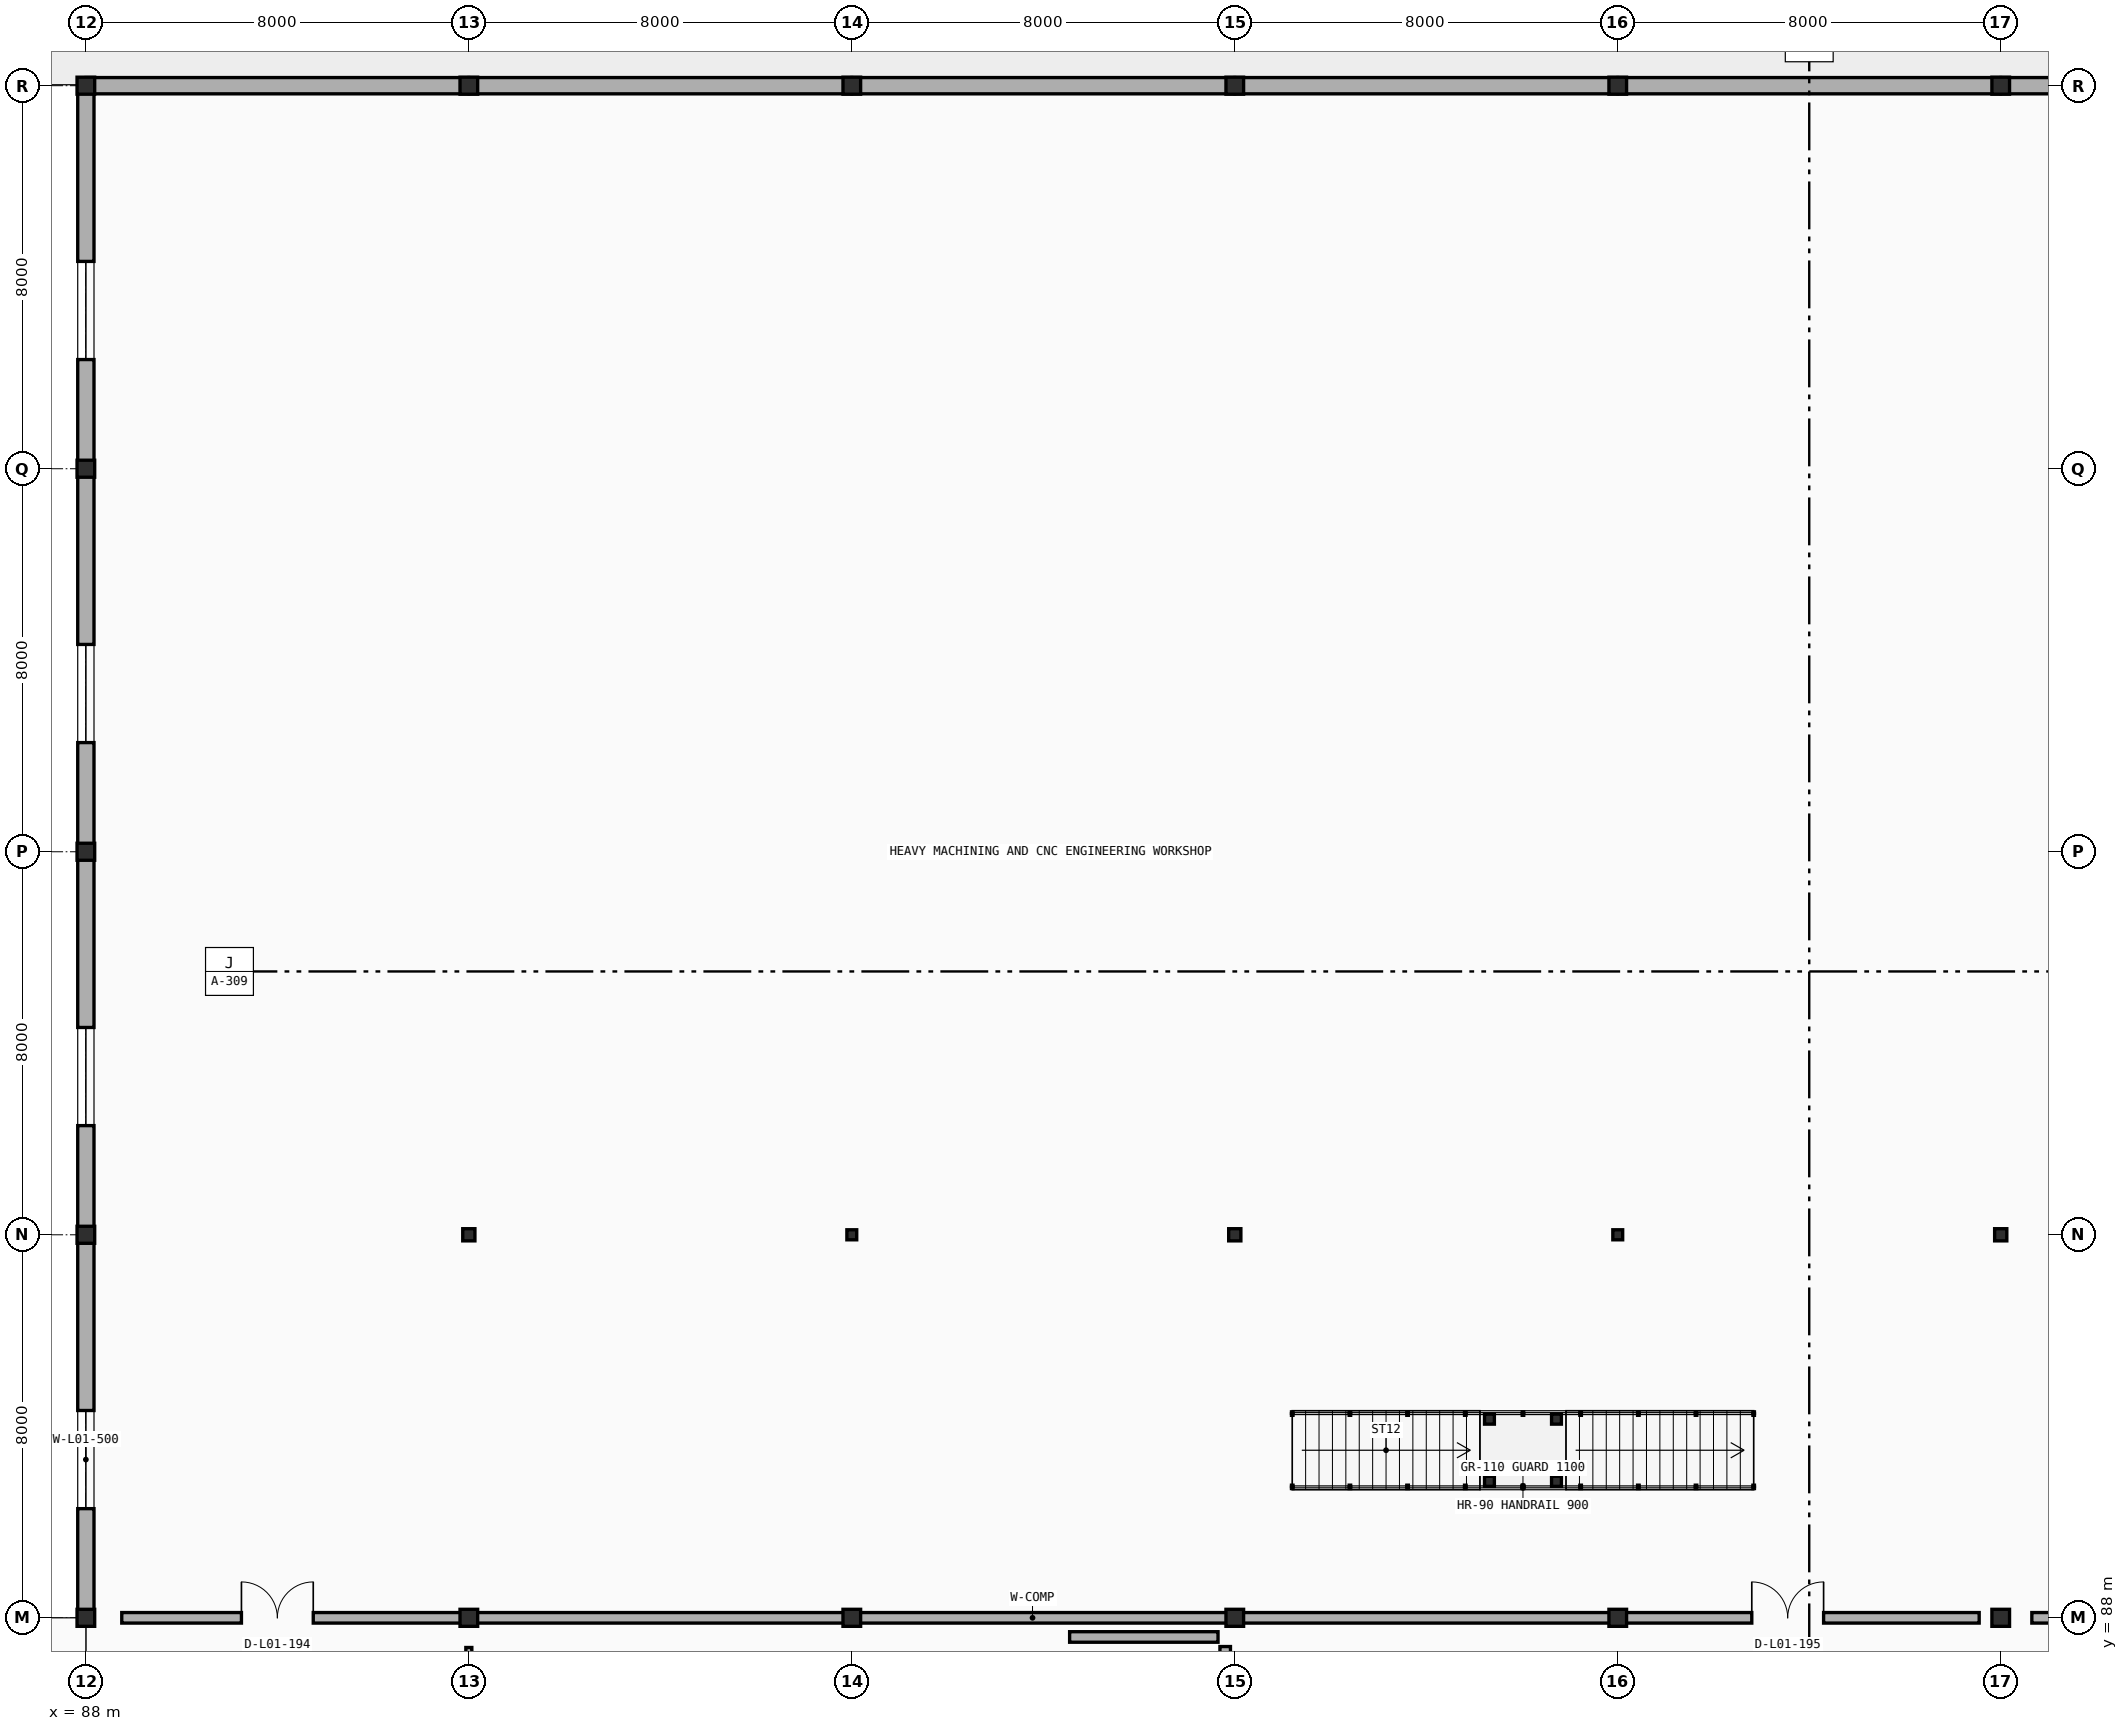
"""IFC4 building model, lengths in metres.
Left out: names, types, materials, properties, quantities, classifications, styles, units other than length and angle.
Written with IfcOpenShell. Run it as: python <this file> out.ifc"""

import sys

from ifc_helpers import new_model, si_unit, direction, frame, frame_2d, origin, origin_2d, place, context, subcontext, project, spatial, rectangle, i_section, extrude, element, fill, save


model = new_model("IFC4")
c1 = context("Model", 3, precision=1e-05, world=origin(), true_north=direction((0.0, 1.0)))
c2 = subcontext(c1, "Body", "Model", "MODEL_VIEW")
j1 = project(units=[si_unit("LENGTHUNIT", "METRE"), si_unit("PLANEANGLEUNIT", "RADIAN")], contexts=[c1])
p1 = place(None, origin())
s1 = spatial("IfcSite", under=j1, at=p1, CompositionType="ELEMENT")
p2 = place(p1, origin())
s2 = spatial("IfcBuilding", under=s1, at=p2, CompositionType="ELEMENT")
p3 = place(p2, origin())
s3 = spatial("IfcBuildingStorey", under=s2, at=p3, CompositionType="ELEMENT", Elevation=0.0)
for number, where, z_axis, x_axis in (
    (1, (88.0, 88.0, 0.0), (0.0, 0.0, 1.0), (1.0, 0.0, 0.0)),
    (2, (96.0, 88.0, 0.0), (0.0, 0.0, 1.0), (1.0, 0.0, 0.0)),
    (3, (104.0, 88.0, 0.0), (0.0, 0.0, 1.0), (1.0, 0.0, 0.0)),
    (4, (112.0, 88.0, 0.0), (0.0, 0.0, 1.0), (1.0, 0.0, 0.0)),
    (5, (120.0, 88.0, 0.0), (0.0, 0.0, 1.0), (1.0, 0.0, 0.0)),
    (6, (128.0, 88.0, 0.0), (0.0, 0.0, 1.0), (1.0, 0.0, 0.0)),
    (7, (88.0, 96.0, 0.0), (0.0, 0.0, 1.0), (1.0, 0.0, 0.0)),
):
    element("IfcColumn", number, at=place(p3, frame(where, z_axis=z_axis, x_axis=x_axis)), inside=s3, PredefinedType="COLUMN", context=c2, shape_type="SweptSolid", body=[
        extrude(i_section(OverallWidth=0.369, OverallDepth=0.356, WebThickness=0.01, FlangeThickness=0.018, FilletRadius=0.015, at=origin_2d()), origin(), (0.0, 0.0, 1.0), 4.8),
    ])
p4 = place(p3, frame((96.0, 96.0, 0.0), z_axis=(0.0, 0.0, 1.0), x_axis=(1.0, 0.0, 0.0)))
e8 = element("IfcColumn", 8, at=p4, inside=s3, PredefinedType="COLUMN", context=c2, shape_type="SweptSolid", body=[
    extrude(i_section(OverallWidth=0.255, OverallDepth=0.254, WebThickness=0.009, FlangeThickness=0.014, FilletRadius=0.013, at=origin_2d()), origin(), (0.0, 0.0, 1.0), 4.8),
])
p5 = place(p3, frame((104.0, 96.0, 0.0), z_axis=(0.0, 0.0, 1.0), x_axis=(1.0, 0.0, 0.0)))
e9 = element("IfcColumn", 9, at=p5, inside=s3, PredefinedType="COLUMN", context=c2, shape_type="SweptSolid", body=[
    extrude(i_section(OverallWidth=0.206, OverallDepth=0.21, WebThickness=0.01, FlangeThickness=0.014, FilletRadius=0.01, at=origin_2d()), origin(), (0.0, 0.0, 1.0), 4.8),
])
p6 = place(p3, frame((112.0, 96.0, 0.0), z_axis=(0.0, 0.0, 1.0), x_axis=(1.0, 0.0, 0.0)))
e10 = element("IfcColumn", 10, at=p6, inside=s3, PredefinedType="COLUMN", context=c2, shape_type="SweptSolid", body=[
    extrude(i_section(OverallWidth=0.255, OverallDepth=0.254, WebThickness=0.009, FlangeThickness=0.014, FilletRadius=0.013, at=origin_2d()), origin(), (0.0, 0.0, 1.0), 4.8),
])
p7 = place(p3, frame((120.0, 96.0, 0.0), z_axis=(0.0, 0.0, 1.0), x_axis=(1.0, 0.0, 0.0)))
e11 = element("IfcColumn", 11, at=p7, inside=s3, PredefinedType="COLUMN", context=c2, shape_type="SweptSolid", body=[
    extrude(i_section(OverallWidth=0.206, OverallDepth=0.21, WebThickness=0.01, FlangeThickness=0.014, FilletRadius=0.01, at=origin_2d()), origin(), (0.0, 0.0, 1.0), 4.8),
])
p8 = place(p3, frame((128.0, 96.0, 0.0), z_axis=(0.0, 0.0, 1.0), x_axis=(1.0, 0.0, 0.0)))
e12 = element("IfcColumn", 12, at=p8, inside=s3, PredefinedType="COLUMN", context=c2, shape_type="SweptSolid", body=[
    extrude(i_section(OverallWidth=0.255, OverallDepth=0.254, WebThickness=0.009, FlangeThickness=0.014, FilletRadius=0.013, at=origin_2d()), origin(), (0.0, 0.0, 1.0), 4.8),
])
for number, where, z_axis, x_axis in (
    (13, (88.0, 104.0, 0.0), (0.0, 0.0, 1.0), (1.0, 0.0, 0.0)),
    (14, (88.0, 112.0, 0.0), (0.0, 0.0, 1.0), (1.0, 0.0, 0.0)),
    (15, (88.0, 120.0, 0.0), (0.0, 0.0, 1.0), (1.0, 0.0, 0.0)),
    (16, (96.0, 120.0, 0.0), (0.0, 0.0, 1.0), (1.0, 0.0, 0.0)),
    (17, (104.0, 120.0, 0.0), (0.0, 0.0, 1.0), (1.0, 0.0, 0.0)),
    (18, (112.0, 120.0, 0.0), (0.0, 0.0, 1.0), (1.0, 0.0, 0.0)),
    (19, (120.0, 120.0, 0.0), (0.0, 0.0, 1.0), (1.0, 0.0, 0.0)),
    (20, (128.0, 120.0, 0.0), (0.0, 0.0, 1.0), (1.0, 0.0, 0.0)),
):
    element("IfcColumn", number, at=place(p3, frame(where, z_axis=z_axis, x_axis=x_axis)), inside=s3, PredefinedType="COLUMN", context=c2, shape_type="SweptSolid", body=[
        extrude(i_section(OverallWidth=0.369, OverallDepth=0.356, WebThickness=0.01, FlangeThickness=0.018, FilletRadius=0.015, at=origin_2d()), origin(), (0.0, 0.0, 1.0), 4.8),
    ])
for number, where, z_axis, x_axis in (
    (21, (117.32, 90.85, 0.0), (0.0, 0.0, 1.0), (1.0, 0.0, 0.0)),
    (22, (117.32, 92.15, 0.0), (0.0, 0.0, 1.0), (1.0, 0.0, 0.0)),
    (23, (118.72, 90.85, 0.0), (0.0, 0.0, 1.0), (1.0, 0.0, 0.0)),
    (24, (118.72, 92.15, 0.0), (0.0, 0.0, 1.0), (1.0, 0.0, 0.0)),
):
    element("IfcColumn", number, at=place(p3, frame(where, z_axis=z_axis, x_axis=x_axis)), inside=s3, PredefinedType="COLUMN", context=c2, shape_type="SweptSolid", body=[
        extrude(i_section(OverallWidth=0.206, OverallDepth=0.21, WebThickness=0.01, FlangeThickness=0.014, FilletRadius=0.01, at=origin_2d()), origin(), (0.0, 0.0, 1.0), 2.2),
    ])
p9 = place(p3, frame((48.0, 120.45, 0.0), z_axis=(0.0, 0.0, 1.0), x_axis=(1.0, 0.0, 0.0)))
e25 = element("IfcWall", 25, at=p9, inside=s3, PredefinedType="PARAPET", context=c2, shape_type="SweptSolid", body=[
    extrude(rectangle(XDim=136.0, YDim=0.3, at=frame_2d((68.0, 0.0))), origin(), (0.0, 0.0, 1.0), 4.65),
])
for number, where, z_axis, x_axis in (
    (26, (88.004, 120.0, 0.0), (0.0, 0.0, 1.0), (1.0, 0.0, 0.0)),
    (27, (96.004, 120.0, 0.0), (0.0, 0.0, 1.0), (1.0, 0.0, 0.0)),
    (28, (104.004, 120.0, 0.0), (0.0, 0.0, 1.0), (1.0, 0.0, 0.0)),
    (29, (112.004, 120.0, 0.0), (0.0, 0.0, 1.0), (1.0, 0.0, 0.0)),
    (30, (120.004, 120.0, 0.0), (0.0, 0.0, 1.0), (1.0, 0.0, 0.0)),
    (31, (128.004, 120.0, 0.0), (0.0, 0.0, 1.0), (1.0, 0.0, 0.0)),
):
    element("IfcWall", number, at=place(p3, frame(where, z_axis=z_axis, x_axis=x_axis)), inside=s3, PredefinedType="STANDARD", context=c2, shape_type="SweptSolid", body=[
        extrude(rectangle(XDim=7.992, YDim=0.34, at=frame_2d((3.996, 0.0))), origin(), (0.0, 0.0, 1.0), 4.12),
    ])
p10 = place(p3, frame((88.0, 88.004, 0.0), z_axis=(0.0, 0.0, 1.0), x_axis=(0.0, 1.0, 0.0)))
e32 = element("IfcWall", 32, at=p10, inside=s3, PredefinedType="STANDARD", context=c2, shape_type="SweptSolid", body=[
    extrude(rectangle(XDim=7.992, YDim=0.34, at=frame_2d((3.996, 0.0))), origin(), (0.0, 0.0, 1.0), 4.037),
])
p11 = place(p10, frame((2.276, 0.0, 1.2)))
e33 = element("IfcOpeningElement", 33, at=p11, cuts=e32, PredefinedType="OPENING", context=c2, shape_type="SweptSolid", body=[
    extrude(rectangle(XDim=2.05, YDim=2.0, at=frame_2d((1.025, 1.0))), frame((0.0, 0.18, 0.0), z_axis=(0.0, -1.0, 0.0), x_axis=(1.0, 0.0, 0.0)), (0.0, 0.0, 1.0), 0.36),
])
p12 = place(p3, frame((88.0, 96.004, 0.0), z_axis=(0.0, 0.0, 1.0), x_axis=(0.0, 1.0, 0.0)))
e34 = element("IfcWall", 34, at=p12, inside=s3, PredefinedType="STANDARD", context=c2, shape_type="SweptSolid", body=[
    extrude(rectangle(XDim=7.992, YDim=0.34, at=frame_2d((3.996, 0.0))), origin(), (0.0, 0.0, 1.0), 4.12),
])
p13 = place(p12, frame((2.276, 0.0, 1.2)))
e35 = element("IfcOpeningElement", 35, at=p13, cuts=e34, PredefinedType="OPENING", context=c2, shape_type="SweptSolid", body=[
    extrude(rectangle(XDim=2.05, YDim=2.0, at=frame_2d((1.025, 1.0))), frame((0.0, 0.18, 0.0), z_axis=(0.0, -1.0, 0.0), x_axis=(1.0, 0.0, 0.0)), (0.0, 0.0, 1.0), 0.36),
])
p14 = place(p3, frame((88.0, 104.004, 0.0), z_axis=(0.0, 0.0, 1.0), x_axis=(0.0, 1.0, 0.0)))
e36 = element("IfcWall", 36, at=p14, inside=s3, PredefinedType="STANDARD", context=c2, shape_type="SweptSolid", body=[
    extrude(rectangle(XDim=7.992, YDim=0.34, at=frame_2d((3.996, 0.0))), origin(), (0.0, 0.0, 1.0), 4.12),
])
p15 = place(p14, frame((2.276, 0.0, 1.2)))
e37 = element("IfcOpeningElement", 37, at=p15, cuts=e36, PredefinedType="OPENING", context=c2, shape_type="SweptSolid", body=[
    extrude(rectangle(XDim=2.05, YDim=2.0, at=frame_2d((1.025, 1.0))), frame((0.0, 0.18, 0.0), z_axis=(0.0, -1.0, 0.0), x_axis=(1.0, 0.0, 0.0)), (0.0, 0.0, 1.0), 0.36),
])
p16 = place(p3, frame((88.0, 112.004, 0.0), z_axis=(0.0, 0.0, 1.0), x_axis=(0.0, 1.0, 0.0)))
e38 = element("IfcWall", 38, at=p16, inside=s3, PredefinedType="STANDARD", context=c2, shape_type="SweptSolid", body=[
    extrude(rectangle(XDim=7.992, YDim=0.34, at=frame_2d((3.996, 0.0))), origin(), (0.0, 0.0, 1.0), 4.12),
])
p17 = place(p16, frame((2.276, 0.0, 1.2)))
e39 = element("IfcOpeningElement", 39, at=p17, cuts=e38, PredefinedType="OPENING", context=c2, shape_type="SweptSolid", body=[
    extrude(rectangle(XDim=2.05, YDim=2.0, at=frame_2d((1.025, 1.0))), frame((0.0, 0.18, 0.0), z_axis=(0.0, -1.0, 0.0), x_axis=(1.0, 0.0, 0.0)), (0.0, 0.0, 1.0), 0.36),
])
p18 = place(p3, frame((108.55, 87.6, 0.0), z_axis=(0.0, 0.0, 1.0), x_axis=(1.0, 0.0, 0.0)))
e40 = element("IfcWall", 40, at=p18, inside=s3, PredefinedType="PARTITIONING", context=c2, shape_type="SweptSolid", body=[
    extrude(rectangle(XDim=3.1, YDim=0.22, at=frame_2d((1.55, 0.0))), origin(), (0.0, 0.0, 1.0), 3.795),
])
p19 = place(p3, frame((111.8, 81.2, 0.0), z_axis=(0.0, 0.0, 1.0), x_axis=(0.0, 1.0, 0.0)))
e41 = element("IfcWall", 41, at=p19, inside=s3, PredefinedType="PARTITIONING", context=c2, shape_type="SweptSolid", body=[
    extrude(rectangle(XDim=6.2, YDim=0.22, at=frame_2d((3.1, 0.0))), origin(), (0.0, 0.0, 1.0), 3.745),
])
p20 = place(p19, frame((3.8, 0.0, 0.0)))
e42 = element("IfcOpeningElement", 42, at=p20, cuts=e41, PredefinedType="OPENING", context=c2, shape_type="SweptSolid", body=[
    extrude(rectangle(XDim=1.5, YDim=2.2, at=frame_2d((0.75, 1.1))), frame((0.0, 0.12, 0.0), z_axis=(0.0, -1.0, 0.0), x_axis=(1.0, 0.0, 0.0)), (0.0, 0.0, 1.0), 0.24),
])
p21 = place(p3, frame((88.75, 88.0, 0.0), z_axis=(0.0, 0.0, 1.0), x_axis=(1.0, 0.0, 0.0)))
e43 = element("IfcWall", 43, at=p21, inside=s3, PredefinedType="PARTITIONING", context=c2, shape_type="SweptSolid", body=[
    extrude(rectangle(XDim=38.8, YDim=0.22, at=frame_2d((19.4, 0.0))), origin(), (0.0, 0.0, 1.0), 3.795),
])
p22 = place(p21, frame((2.5, 0.0, 0.0)))
e44 = element("IfcOpeningElement", 44, at=p22, cuts=e43, PredefinedType="OPENING", context=c2, shape_type="SweptSolid", body=[
    extrude(rectangle(XDim=1.5, YDim=2.2, at=frame_2d((0.75, 1.1))), frame((0.0, 0.12, 0.0), z_axis=(0.0, -1.0, 0.0), x_axis=(1.0, 0.0, 0.0)), (0.0, 0.0, 1.0), 0.24),
])
p23 = place(p21, frame((34.05, 0.0, 0.0)))
e45 = element("IfcOpeningElement", 45, at=p23, cuts=e43, PredefinedType="OPENING", context=c2, shape_type="SweptSolid", body=[
    extrude(rectangle(XDim=1.5, YDim=2.2, at=frame_2d((0.75, 1.1))), frame((0.0, 0.12, 0.0), z_axis=(0.0, -1.0, 0.0), x_axis=(1.0, 0.0, 0.0)), (0.0, 0.0, 1.0), 0.24),
])
p24 = place(p3, frame((128.65, 88.0, 0.0), z_axis=(0.0, 0.0, 1.0), x_axis=(1.0, 0.0, 0.0)))
e46 = element("IfcWall", 46, at=p24, inside=s3, PredefinedType="PARTITIONING", context=c2, shape_type="SweptSolid", body=[
    extrude(rectangle(XDim=38.9, YDim=0.22, at=frame_2d((19.45, 0.0))), origin(), (0.0, 0.0, 1.0), 3.795),
])
p25 = place(p24, frame((2.6, 0.0, 0.0)))
e47 = element("IfcOpeningElement", 47, at=p25, cuts=e46, PredefinedType="OPENING", context=c2, shape_type="SweptSolid", body=[
    extrude(rectangle(XDim=1.5, YDim=2.2, at=frame_2d((0.75, 1.1))), frame((0.0, 0.12, 0.0), z_axis=(0.0, -1.0, 0.0), x_axis=(1.0, 0.0, 0.0)), (0.0, 0.0, 1.0), 0.24),
])
p26 = place(p24, frame((34.15, 0.0, 0.0)))
e48 = element("IfcOpeningElement", 48, at=p26, cuts=e46, PredefinedType="OPENING", context=c2, shape_type="SweptSolid", body=[
    extrude(rectangle(XDim=1.5, YDim=2.2, at=frame_2d((0.75, 1.1))), frame((0.0, 0.12, 0.0), z_axis=(0.0, -1.0, 0.0), x_axis=(1.0, 0.0, 0.0)), (0.0, 0.0, 1.0), 0.24),
])
p27 = place(p3, frame((96.0, 80.62, 0.0), z_axis=(0.0, 0.0, 1.0), x_axis=(0.0, 1.0, 0.0)))
e49 = element("IfcWall", 49, at=p27, inside=s3, PredefinedType="PARTITIONING", context=c2, shape_type="SweptSolid", body=[
    extrude(rectangle(XDim=6.76, YDim=0.125, at=frame_2d((3.38, 0.0))), origin(), (0.0, 0.0, 1.0), 3.745),
])
p28 = place(p11, origin())
e50 = element("IfcWindow", 50, at=p28, inside=s3, PartitioningType="DOUBLE_PANEL_VERTICAL", PredefinedType="WINDOW", context=c2, shape_type="SweptSolid", body=[
    extrude(rectangle(XDim=2.05, YDim=2.0, at=frame_2d((1.025, 1.0))), frame((0.0, 0.03, 0.0), z_axis=(0.0, -1.0, 0.0), x_axis=(1.0, 0.0, 0.0)), (0.0, 0.0, 1.0), 0.06),
])
fill(e33, e50)
p29 = place(p13, origin())
e51 = element("IfcWindow", 51, at=p29, inside=s3, PartitioningType="DOUBLE_PANEL_VERTICAL", PredefinedType="WINDOW", context=c2, shape_type="SweptSolid", body=[
    extrude(rectangle(XDim=2.05, YDim=2.0, at=frame_2d((1.025, 1.0))), frame((0.0, 0.03, 0.0), z_axis=(0.0, -1.0, 0.0), x_axis=(1.0, 0.0, 0.0)), (0.0, 0.0, 1.0), 0.06),
])
fill(e35, e51)
p30 = place(p15, origin())
e52 = element("IfcWindow", 52, at=p30, inside=s3, PartitioningType="DOUBLE_PANEL_VERTICAL", PredefinedType="WINDOW", context=c2, shape_type="SweptSolid", body=[
    extrude(rectangle(XDim=2.05, YDim=2.0, at=frame_2d((1.025, 1.0))), frame((0.0, 0.03, 0.0), z_axis=(0.0, -1.0, 0.0), x_axis=(1.0, 0.0, 0.0)), (0.0, 0.0, 1.0), 0.06),
])
fill(e37, e52)
p31 = place(p17, origin())
e53 = element("IfcWindow", 53, at=p31, inside=s3, PartitioningType="DOUBLE_PANEL_VERTICAL", PredefinedType="WINDOW", context=c2, shape_type="SweptSolid", body=[
    extrude(rectangle(XDim=2.05, YDim=2.0, at=frame_2d((1.025, 1.0))), frame((0.0, 0.03, 0.0), z_axis=(0.0, -1.0, 0.0), x_axis=(1.0, 0.0, 0.0)), (0.0, 0.0, 1.0), 0.06),
])
fill(e39, e53)
p32 = place(p22, origin())
e54 = element("IfcDoor", 54, at=p32, inside=s3, OperationType="DOUBLE_DOOR_SINGLE_SWING", PredefinedType="DOOR", context=c2, shape_type="SweptSolid", body=[
    extrude(rectangle(XDim=1.5, YDim=2.2, at=frame_2d((0.75, 1.1))), frame((0.0, 0.025, 0.0), z_axis=(0.0, -1.0, 0.0), x_axis=(1.0, 0.0, 0.0)), (0.0, 0.0, 1.0), 0.05),
])
fill(e44, e54)
p33 = place(p23, origin())
e55 = element("IfcDoor", 55, at=p33, inside=s3, OperationType="DOUBLE_DOOR_SINGLE_SWING", PredefinedType="DOOR", context=c2, shape_type="SweptSolid", body=[
    extrude(rectangle(XDim=1.5, YDim=2.2, at=frame_2d((0.75, 1.1))), frame((0.0, 0.025, 0.0), z_axis=(0.0, -1.0, 0.0), x_axis=(1.0, 0.0, 0.0)), (0.0, 0.0, 1.0), 0.05),
])
fill(e45, e55)
save(model, sys.argv[1])
